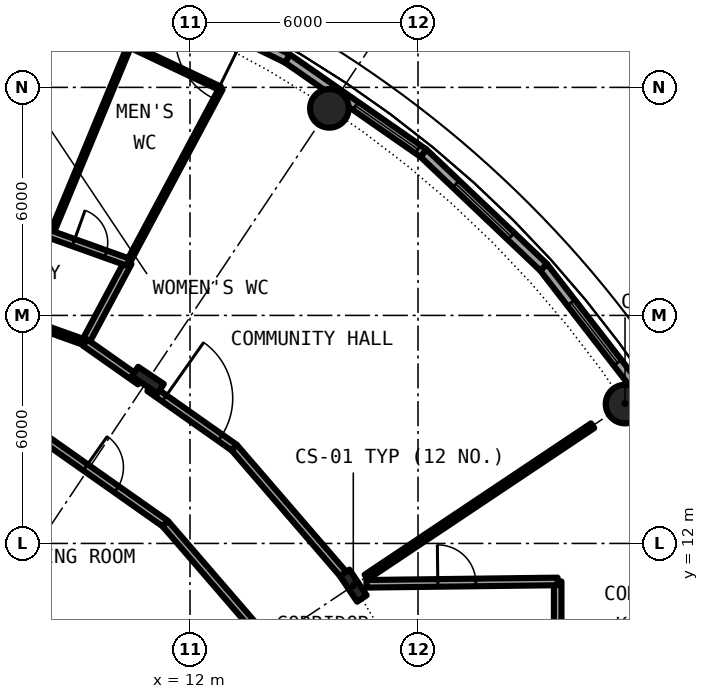
"""IFC4 building model, lengths in metres.
Left out: names, types, materials, properties, quantities, classifications, styles, units other than length and angle.
Written with IfcOpenShell. Run it as: python <this file> out.ifc"""

import sys

from ifc_helpers import new_model, si_unit, direction, frame, frame_2d, origin, origin_2d, place, context, subcontext, project, spatial, rectangle, hollow_circle, i_section, extrude, element, fill, save


model = new_model("IFC4")
c1 = context("Model", 3, precision=1e-05, world=origin(), true_north=direction((0.0, 1.0)))
c2 = subcontext(c1, "Body", "Model", "MODEL_VIEW")
j1 = project(units=[si_unit("LENGTHUNIT", "METRE"), si_unit("PLANEANGLEUNIT", "RADIAN")], contexts=[c1])
p1 = place(None, origin())
s1 = spatial("IfcSite", under=j1, at=p1, CompositionType="ELEMENT")
p2 = place(p1, origin())
s2 = spatial("IfcBuilding", under=s1, at=p2, CompositionType="ELEMENT")
p3 = place(p2, frame((0.0, 0.0, 9.6)))
s3 = spatial("IfcBuildingStorey", under=s2, at=p3, CompositionType="ELEMENT", Elevation=9.6)
for number, where, z_axis, x_axis in (
    (1, (23.448, 15.667, 0.0), (0.0, 0.0, 1.0), (1.0, 0.0, 0.0)),
    (2, (15.667, 23.448, 0.0), (0.0, 0.0, 1.0), (1.0, 0.0, 0.0)),
):
    element("IfcColumn", number, at=place(p3, frame(where, z_axis=z_axis, x_axis=x_axis)), inside=s3, PredefinedType="COLUMN", context=c2, shape_type="SweptSolid", body=[
        extrude(hollow_circle(Radius=0.508, WallThickness=0.05, at=origin_2d()), origin(), (0.0, 0.0, 1.0), 4.5),
    ])
for number, where, z_axis, x_axis in (
    (3, (16.297, 10.889, 0.0), (0.0, 0.0, 1.0), (0.831, 0.556, 0.0)),
    (4, (10.889, 16.297, 0.0), (0.0, 0.0, 1.0), (0.556, 0.831, 0.0)),
):
    element("IfcColumn", number, at=place(p3, frame(where, z_axis=z_axis, x_axis=x_axis)), inside=s3, PredefinedType="COLUMN", context=c2, shape_type="SweptSolid", body=[
        extrude(i_section(OverallWidth=0.303, OverallDepth=0.814, WebThickness=0.021, FlangeThickness=0.04, FilletRadius=0.03, at=origin_2d()), origin(), (0.0, 0.0, 1.0), 4.5),
    ])
p4 = place(p3, frame((23.975, 15.822, 0.0), z_axis=(0.0, 0.0, 1.0), x_axis=(-0.612637256412, 0.790364214812, 0.0)))
e5 = element("IfcWall", 5, at=p4, inside=s3, PredefinedType="SOLIDWALL", context=c2, shape_type="SweptSolid", body=[
    extrude(rectangle(XDim=4.36, YDim=0.25, at=frame_2d((2.18, 0.0))), origin(), (0.0, 0.0, 1.0), 4.05),
])
p5 = place(p4, frame((1.18, 0.0, 0.9)))
e6 = element("IfcOpeningElement", 6, at=p5, cuts=e5, PredefinedType="OPENING", context=c2, shape_type="SweptSolid", body=[
    extrude(rectangle(XDim=2.0, YDim=2.4, at=frame_2d((1.0, 1.2))), frame((0.0, 0.135, 0.0), z_axis=(0.0, -1.0, 0.0), x_axis=(1.0, 0.0, 0.0)), (0.0, 0.0, 1.0), 0.27),
])
p6 = place(p3, frame((21.304, 19.268, 0.0), z_axis=(0.0, 0.0, 1.0), x_axis=(-0.725101501119, 0.68864200647, 0.0)))
e7 = element("IfcWall", 7, at=p6, inside=s3, PredefinedType="SOLIDWALL", context=c2, shape_type="SweptSolid", body=[
    extrude(rectangle(XDim=4.359, YDim=0.25, at=frame_2d((2.18, 0.0))), origin(), (0.0, 0.0, 1.0), 4.05),
])
p7 = place(p6, frame((1.18, 0.0, 0.9)))
e8 = element("IfcOpeningElement", 8, at=p7, cuts=e7, PredefinedType="OPENING", context=c2, shape_type="SweptSolid", body=[
    extrude(rectangle(XDim=2.0, YDim=2.4, at=frame_2d((1.0, 1.2))), frame((0.0, 0.135, 0.0), z_axis=(0.0, -1.0, 0.0), x_axis=(1.0, 0.0, 0.0)), (0.0, 0.0, 1.0), 0.27),
])
p8 = place(p3, frame((18.143, 22.27, 0.0), z_axis=(0.0, 0.0, 1.0), x_axis=(-0.820990800869, 0.57094141984, 0.0)))
e9 = element("IfcWall", 9, at=p8, inside=s3, PredefinedType="SOLIDWALL", context=c2, shape_type="SweptSolid", body=[
    extrude(rectangle(XDim=4.359, YDim=0.25, at=frame_2d((2.18, 0.0))), origin(), (0.0, 0.0, 1.0), 4.05),
])
p9 = place(p8, frame((0.177, 0.0, 0.9)))
e10 = element("IfcOpeningElement", 10, at=p9, cuts=e9, PredefinedType="OPENING", context=c2, shape_type="SweptSolid", body=[
    extrude(rectangle(XDim=2.0, YDim=2.4, at=frame_2d((1.0, 1.2))), frame((0.0, 0.135, 0.0), z_axis=(0.0, -1.0, 0.0), x_axis=(1.0, 0.0, 0.0)), (0.0, 0.0, 1.0), 0.27),
])
p10 = place(p3, frame((14.564, 24.759, 0.0), z_axis=(0.0, 0.0, 1.0), x_axis=(-0.897938079481, 0.440121807478, 0.0)))
e11 = element("IfcWall", 11, at=p10, inside=s3, PredefinedType="SOLIDWALL", context=c2, shape_type="SweptSolid", body=[
    extrude(rectangle(XDim=4.36, YDim=0.25, at=frame_2d((2.18, 0.0))), origin(), (0.0, 0.0, 1.0), 4.05),
])
p11 = place(p10, frame((1.28, 0.0, 0.0)))
e12 = element("IfcOpeningElement", 12, at=p11, cuts=e11, PredefinedType="OPENING", context=c2, shape_type="SweptSolid", body=[
    extrude(rectangle(XDim=1.8, YDim=2.2, at=frame_2d((0.9, 1.1))), frame((0.0, 0.135, 0.0), z_axis=(0.0, -1.0, 0.0), x_axis=(1.0, 0.0, 0.0)), (0.0, 0.0, 1.0), 0.27),
])
p12 = place(p3, frame((21.675, 9.4, 0.0), z_axis=(0.0, 0.0, 1.0), x_axis=(0.0, 1.0, 0.0)))
e13 = element("IfcWall", 13, at=p12, inside=s3, PredefinedType="PARTITIONING", context=c2, shape_type="SweptSolid", body=[
    extrude(rectangle(XDim=1.6, YDim=0.2, at=frame_2d((0.8, 0.0))), origin(), (0.0, 0.0, 1.0), 4.05),
])
p13 = place(p3, frame((8.345, 20.127, 0.0), z_axis=(0.0, 0.0, 1.0), x_axis=(0.382973519041, 0.923759321313, 0.0)))
e14 = element("IfcWall", 14, at=p13, inside=s3, PredefinedType="PARTITIONING", context=c2, shape_type="SweptSolid", body=[
    extrude(rectangle(XDim=5.387, YDim=0.1, at=frame_2d((2.693, 0.0))), origin(), (0.0, 0.0, 1.0), 4.05),
])
p14 = place(p3, frame((9.242, 17.285, 0.0), z_axis=(0.0, 0.0, 1.0), x_axis=(0.471597030656, 0.88181417582, 0.0)))
e15 = element("IfcWall", 15, at=p14, inside=s3, PredefinedType="PARTITIONING", context=c2, shape_type="SweptSolid", body=[
    extrude(rectangle(XDim=2.398, YDim=0.2, at=frame_2d((1.199, 0.0))), origin(), (0.0, 0.0, 1.0), 4.05),
])
p15 = place(p3, frame((10.373, 19.401, 0.0), z_axis=(0.0, 0.0, 1.0), x_axis=(0.471444958676, 0.881895487537, 0.0)))
e16 = element("IfcWall", 16, at=p15, inside=s3, PredefinedType="PARTITIONING", context=c2, shape_type="SweptSolid", body=[
    extrude(rectangle(XDim=5.176, YDim=0.1, at=frame_2d((2.588, 0.0))), origin(), (0.0, 0.0, 1.0), 4.05),
])
p16 = place(p3, frame((16.635, 11.115, 0.0), z_axis=(0.0, 0.0, 1.0), x_axis=(0.831431488123, 0.555627285648, 0.0)))
e17 = element("IfcWall", 17, at=p16, inside=s3, PredefinedType="PARTITIONING", context=c2, shape_type="SweptSolid", body=[
    extrude(rectangle(XDim=7.168, YDim=0.15, at=frame_2d((3.584, 0.0))), origin(), (0.0, 0.0, 1.0), 4.05),
])
p17 = place(p3, frame((16.643, 10.938, 0.0), z_axis=(0.0, 0.0, 1.0), x_axis=(0.999924074118, 0.012322580895, 0.0)))
e18 = element("IfcWall", 18, at=p17, inside=s3, PredefinedType="PARTITIONING", context=c2, shape_type="SweptSolid", body=[
    extrude(rectangle(XDim=5.032, YDim=0.2, at=frame_2d((2.516, 0.0))), origin(), (0.0, 0.0, 1.0), 4.05),
])
p18 = place(p17, frame((1.878, 0.0, 0.0)))
e19 = element("IfcOpeningElement", 19, at=p18, cuts=e18, PredefinedType="OPENING", context=c2, shape_type="SweptSolid", body=[
    extrude(rectangle(XDim=1.0, YDim=2.3, at=frame_2d((0.5, 1.15))), frame((0.0, 0.11, 0.0), z_axis=(0.0, -1.0, 0.0), x_axis=(1.0, 0.0, 0.0)), (0.0, 0.0, 1.0), 0.22),
])
p19 = place(p3, frame((7.967, 14.904, 0.0), z_axis=(0.0, 0.0, 1.0), x_axis=(0.817567680547, -0.575832517079, 0.0)))
e20 = element("IfcWall", 20, at=p19, inside=s3, PredefinedType="PARTITIONING", context=c2, shape_type="SweptSolid", body=[
    extrude(rectangle(XDim=4.137, YDim=0.2, at=frame_2d((2.068, 0.0))), origin(), (0.0, 0.0, 1.0), 4.05),
])
p20 = place(p19, frame((1.568, 0.0, 0.0)))
e21 = element("IfcOpeningElement", 21, at=p20, cuts=e20, PredefinedType="OPENING", context=c2, shape_type="SweptSolid", body=[
    extrude(rectangle(XDim=1.0, YDim=2.3, at=frame_2d((0.5, 1.15))), frame((0.0, 0.11, 0.0), z_axis=(0.0, -1.0, 0.0), x_axis=(1.0, 0.0, 0.0)), (0.0, 0.0, 1.0), 0.22),
])
p21 = place(p3, frame((11.349, 12.522, 0.0), z_axis=(0.0, 0.0, 1.0), x_axis=(0.653274518104, -0.757121129012, 0.0)))
e22 = element("IfcWall", 22, at=p21, inside=s3, PredefinedType="PARTITIONING", context=c2, shape_type="SweptSolid", body=[
    extrude(rectangle(XDim=4.124, YDim=0.2, at=frame_2d((2.062, 0.0))), origin(), (0.0, 0.0, 1.0), 4.05),
])
p22 = place(p3, frame((3.968, 19.172, 0.0), z_axis=(0.0, 0.0, 1.0), x_axis=(0.941530584678, -0.336927526504, 0.0)))
e23 = element("IfcWall", 23, at=p22, inside=s3, PredefinedType="PARTITIONING", context=c2, shape_type="SweptSolid", body=[
    extrude(rectangle(XDim=5.598, YDim=0.15, at=frame_2d((2.799, 0.0))), origin(), (0.0, 0.0, 1.0), 3.63),
])
p23 = place(p22, frame((2.223, 0.0, 0.0)))
e24 = element("IfcOpeningElement", 24, at=p23, cuts=e23, PredefinedType="OPENING", context=c2, shape_type="SweptSolid", body=[
    extrude(rectangle(XDim=1.0, YDim=2.3, at=frame_2d((0.5, 1.15))), frame((0.0, 0.085, 0.0), z_axis=(0.0, -1.0, 0.0), x_axis=(1.0, 0.0, 0.0)), (0.0, 0.0, 1.0), 0.17),
])
p24 = place(p3, frame((9.239, 17.286, 0.0), z_axis=(0.0, 0.0, 1.0), x_axis=(0.817849682833, -0.575431921508, 0.0)))
e25 = element("IfcWall", 25, at=p24, inside=s3, PredefinedType="PARTITIONING", context=c2, shape_type="SweptSolid", body=[
    extrude(rectangle(XDim=1.771, YDim=0.2, at=frame_2d((0.885, 0.0))), origin(), (0.0, 0.0, 1.0), 3.63),
])
p25 = place(p3, frame((10.935, 16.092, 0.0), z_axis=(0.0, 0.0, 1.0), x_axis=(0.817595540973, -0.575792958781, 0.0)))
e26 = element("IfcWall", 26, at=p25, inside=s3, PredefinedType="PARTITIONING", context=c2, shape_type="SweptSolid", body=[
    extrude(rectangle(XDim=2.725, YDim=0.2, at=frame_2d((1.363, 0.0))), origin(), (0.0, 0.0, 1.0), 3.63),
])
p26 = place(p25, frame((0.476, 0.0, 0.0)))
e27 = element("IfcOpeningElement", 27, at=p26, cuts=e26, PredefinedType="OPENING", context=c2, shape_type="SweptSolid", body=[
    extrude(rectangle(XDim=1.8, YDim=2.3, at=frame_2d((0.9, 1.15))), frame((0.0, 0.11, 0.0), z_axis=(0.0, -1.0, 0.0), x_axis=(1.0, 0.0, 0.0)), (0.0, 0.0, 1.0), 0.22),
])
p27 = place(p3, frame((13.163, 14.523, 0.0), z_axis=(0.0, 0.0, 1.0), x_axis=(0.653077876854, -0.757290754443, 0.0)))
e28 = element("IfcWall", 28, at=p27, inside=s3, PredefinedType="PARTITIONING", context=c2, shape_type="SweptSolid", body=[
    extrude(rectangle(XDim=4.646, YDim=0.2, at=frame_2d((2.323, 0.0))), origin(), (0.0, 0.0, 1.0), 3.63),
])
p28 = place(p3, frame((4.292, 21.577, 0.0), z_axis=(0.0, 0.0, 1.0), x_axis=(0.941534771306, -0.336915826909, 0.0)))
e29 = element("IfcWall", 29, at=p28, inside=s3, PredefinedType="PARTITIONING", context=c2, shape_type="SweptSolid", body=[
    extrude(rectangle(XDim=6.459, YDim=0.2, at=frame_2d((3.229, 0.0))), origin(), (0.0, 0.0, 1.0), 4.05),
])
p29 = place(p28, frame((4.931, 0.0, 0.0)))
e30 = element("IfcOpeningElement", 30, at=p29, cuts=e29, PredefinedType="OPENING", context=c2, shape_type="SweptSolid", body=[
    extrude(rectangle(XDim=0.9, YDim=2.3, at=frame_2d((0.45, 1.15))), frame((0.0, 0.11, 0.0), z_axis=(0.0, -1.0, 0.0), x_axis=(1.0, 0.0, 0.0)), (0.0, 0.0, 1.0), 0.22),
])
p30 = place(p28, frame((2.778, 0.0, 0.0)))
e31 = element("IfcOpeningElement", 31, at=p30, cuts=e29, PredefinedType="OPENING", context=c2, shape_type="SweptSolid", body=[
    extrude(rectangle(XDim=0.9, YDim=2.3, at=frame_2d((0.45, 1.15))), frame((0.0, 0.11, 0.0), z_axis=(0.0, -1.0, 0.0), x_axis=(1.0, 0.0, 0.0)), (0.0, 0.0, 1.0), 0.22),
])
p31 = place(p28, frame((0.626, 0.0, 0.0)))
e32 = element("IfcOpeningElement", 32, at=p31, cuts=e29, PredefinedType="OPENING", context=c2, shape_type="SweptSolid", body=[
    extrude(rectangle(XDim=0.9, YDim=2.3, at=frame_2d((0.45, 1.15))), frame((0.0, 0.11, 0.0), z_axis=(0.0, -1.0, 0.0), x_axis=(1.0, 0.0, 0.0)), (0.0, 0.0, 1.0), 0.22),
])
p32 = place(p3, frame((10.425, 25.094, 0.0), z_axis=(0.0, 0.0, 1.0), x_axis=(0.904075542006, -0.427372687882, 0.0)))
e33 = element("IfcWall", 33, at=p32, inside=s3, PredefinedType="PARTITIONING", context=c2, shape_type="SweptSolid", body=[
    extrude(rectangle(XDim=2.618, YDim=0.1, at=frame_2d((1.309, 0.0))), origin(), (0.0, 0.0, 1.0), 4.05),
])
p33 = place(p5, origin())
e34 = element("IfcWindow", 34, at=p33, inside=s3, PartitioningType="SINGLE_PANEL", PredefinedType="WINDOW", context=c2, shape_type="SweptSolid", body=[
    extrude(rectangle(XDim=2.0, YDim=2.4, at=frame_2d((1.0, 1.2))), frame((0.0, 0.03, 0.0), z_axis=(0.0, -1.0, 0.0), x_axis=(1.0, 0.0, 0.0)), (0.0, 0.0, 1.0), 0.06),
])
fill(e6, e34)
p34 = place(p7, origin())
e35 = element("IfcWindow", 35, at=p34, inside=s3, PartitioningType="SINGLE_PANEL", PredefinedType="WINDOW", context=c2, shape_type="SweptSolid", body=[
    extrude(rectangle(XDim=2.0, YDim=2.4, at=frame_2d((1.0, 1.2))), frame((0.0, 0.03, 0.0), z_axis=(0.0, -1.0, 0.0), x_axis=(1.0, 0.0, 0.0)), (0.0, 0.0, 1.0), 0.06),
])
fill(e8, e35)
p35 = place(p9, origin())
e36 = element("IfcWindow", 36, at=p35, inside=s3, PartitioningType="SINGLE_PANEL", PredefinedType="WINDOW", context=c2, shape_type="SweptSolid", body=[
    extrude(rectangle(XDim=2.0, YDim=2.4, at=frame_2d((1.0, 1.2))), frame((0.0, 0.03, 0.0), z_axis=(0.0, -1.0, 0.0), x_axis=(1.0, 0.0, 0.0)), (0.0, 0.0, 1.0), 0.06),
])
fill(e10, e36)
p36 = place(p29, origin())
e37 = element("IfcDoor", 37, at=p36, inside=s3, OperationType="SINGLE_SWING_RIGHT", PredefinedType="DOOR", context=c2, shape_type="SweptSolid", body=[
    extrude(rectangle(XDim=0.9, YDim=2.3, at=frame_2d((0.45, 1.15))), frame((0.0, 0.025, 0.0), z_axis=(0.0, -1.0, 0.0), x_axis=(1.0, 0.0, 0.0)), (0.0, 0.0, 1.0), 0.05),
])
fill(e30, e37)
p37 = place(p26, origin())
e38 = element("IfcDoor", 38, at=p37, inside=s3, OperationType="DOUBLE_DOOR_SINGLE_SWING", PredefinedType="DOOR", context=c2, shape_type="SweptSolid", body=[
    extrude(rectangle(XDim=1.8, YDim=2.3, at=frame_2d((0.9, 1.15))), frame((0.0, 0.025, 0.0), z_axis=(0.0, -1.0, 0.0), x_axis=(1.0, 0.0, 0.0)), (0.0, 0.0, 1.0), 0.05),
])
fill(e27, e38)
p38 = place(p20, origin())
e39 = element("IfcDoor", 39, at=p38, inside=s3, OperationType="SINGLE_SWING_LEFT", PredefinedType="DOOR", context=c2, shape_type="SweptSolid", body=[
    extrude(rectangle(XDim=1.0, YDim=2.3, at=frame_2d((0.5, 1.15))), frame((0.0, 0.025, 0.0), z_axis=(0.0, -1.0, 0.0), x_axis=(1.0, 0.0, 0.0)), (0.0, 0.0, 1.0), 0.05),
])
fill(e21, e39)
p39 = place(p18, origin())
e40 = element("IfcDoor", 40, at=p39, inside=s3, OperationType="SINGLE_SWING_LEFT", PredefinedType="DOOR", context=c2, shape_type="SweptSolid", body=[
    extrude(rectangle(XDim=1.0, YDim=2.3, at=frame_2d((0.5, 1.15))), frame((0.0, 0.025, 0.0), z_axis=(0.0, -1.0, 0.0), x_axis=(1.0, 0.0, 0.0)), (0.0, 0.0, 1.0), 0.05),
])
fill(e19, e40)
save(model, sys.argv[1])
